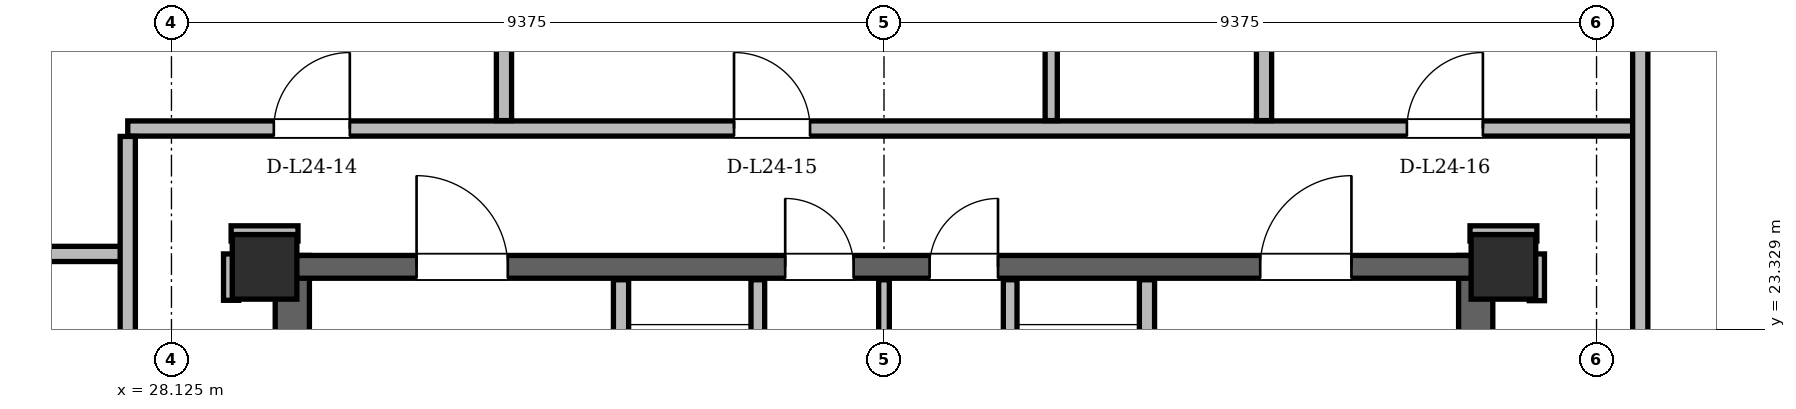
"""IFC4 building model, lengths in metres.
Left out: names, types, materials, properties, quantities, classifications, styles, units other than length and angle.
Written with IfcOpenShell. Run it as: python <this file> out.ifc"""

import sys

from ifc_helpers import new_model, si_unit, direction, frame, frame_2d, origin, origin_2d, place, context, subcontext, project, spatial, rectangle, hollow_rectangle, extrude, element, fill, save


model = new_model("IFC4")
c1 = context("Model", 3, precision=1e-05, world=origin(), true_north=direction((0.0, 1.0)))
c2 = subcontext(c1, "Body", "Model", "MODEL_VIEW")
j1 = project(units=[si_unit("LENGTHUNIT", "METRE"), si_unit("PLANEANGLEUNIT", "RADIAN")], contexts=[c1])
p1 = place(None, origin())
s1 = spatial("IfcSite", under=j1, at=p1, CompositionType="ELEMENT")
p2 = place(p1, origin())
s2 = spatial("IfcBuilding", under=s1, at=p2, CompositionType="ELEMENT")
p3 = place(p2, frame((0.0, 0.0, 93.3)))
s3 = spatial("IfcBuildingStorey", under=s2, at=p3, CompositionType="ELEMENT", Elevation=93.3)
for number, where, z_axis, x_axis in (
    (1, (45.65, 24.15, 0.0), (0.0, 0.0, 1.0), (1.0, 0.0, 0.0)),
    (2, (29.35, 24.15, 0.0), (0.0, 0.0, 1.0), (1.0, 0.0, 0.0)),
):
    element("IfcColumn", number, at=place(p3, frame(where, z_axis=z_axis, x_axis=x_axis)), inside=s3, PredefinedType="COLUMN", context=c2, shape_type="SweptSolid", body=[
        extrude(hollow_rectangle(XDim=0.85, YDim=0.85, WallThickness=0.07, at=origin_2d()), origin(), (0.0, 0.0, 1.0), 3.6),
    ])
for number, where, z_axis, x_axis in (
    (3, (29.715, 11.0, 0.0), (0.0, 0.0, 1.0), (0.0, 1.0, 0.0)),
    (4, (45.285, 11.0, 0.0), (0.0, 0.0, 1.0), (0.0, 1.0, 0.0)),
):
    element("IfcWall", number, at=place(p3, frame(where, z_axis=z_axis, x_axis=x_axis)), inside=s3, PredefinedType="SHEAR", context=c2, shape_type="SweptSolid", body=[
        extrude(rectangle(XDim=13.3, YDim=0.45, at=frame_2d((6.65, 0.0))), origin(), (0.0, 0.0, 1.0), 3.36),
    ])
p4 = place(p3, frame((29.65, 24.15, 0.0), z_axis=(0.0, 0.0, 1.0), x_axis=(1.0, 0.0, 0.0)))
e5 = element("IfcWall", 5, at=p4, inside=s3, PredefinedType="SHEAR", context=c2, shape_type="SweptSolid", body=[
    extrude(rectangle(XDim=15.7, YDim=0.3, at=frame_2d((7.85, 0.0))), origin(), (0.0, 0.0, 1.0), 3.36),
])
p5 = place(p4, frame((1.7, 0.0, 0.0)))
e6 = element("IfcOpeningElement", 6, at=p5, cuts=e5, PredefinedType="OPENING", context=c2, shape_type="SweptSolid", body=[
    extrude(rectangle(XDim=1.2, YDim=2.2, at=frame_2d((0.6, 1.1))), frame((0.0, 0.15, 0.0), z_axis=(0.0, -1.0, 0.0), x_axis=(1.0, 0.0, 0.0)), (0.0, 0.0, 1.0), 0.3),
])
p6 = place(p4, frame((12.8, 0.0, 0.0)))
e7 = element("IfcOpeningElement", 7, at=p6, cuts=e5, PredefinedType="OPENING", context=c2, shape_type="SweptSolid", body=[
    extrude(rectangle(XDim=1.2, YDim=2.2, at=frame_2d((0.6, 1.1))), frame((0.0, 0.15, 0.0), z_axis=(0.0, -1.0, 0.0), x_axis=(1.0, 0.0, 0.0)), (0.0, 0.0, 1.0), 0.3),
])
p7 = place(p4, frame((6.55, 0.0, 0.0)))
e8 = element("IfcOpeningElement", 8, at=p7, cuts=e5, PredefinedType="OPENING", context=c2, shape_type="SweptSolid", body=[
    extrude(rectangle(XDim=0.9, YDim=2.05, at=frame_2d((0.45, 1.025))), frame((0.0, 0.15, 0.0), z_axis=(0.0, -1.0, 0.0), x_axis=(1.0, 0.0, 0.0)), (0.0, 0.0, 1.0), 0.3),
])
p8 = place(p4, frame((8.45, 0.0, 0.0)))
e9 = element("IfcOpeningElement", 9, at=p8, cuts=e5, PredefinedType="OPENING", context=c2, shape_type="SweptSolid", body=[
    extrude(rectangle(XDim=0.9, YDim=2.05, at=frame_2d((0.45, 1.025))), frame((0.0, 0.15, 0.0), z_axis=(0.0, -1.0, 0.0), x_axis=(1.0, 0.0, 0.0)), (0.0, 0.0, 1.0), 0.3),
])
p9 = place(p3, frame((31.375, 43.472, 0.0), z_axis=(0.0, 0.0, 1.0), x_axis=(-0.499996390212, -0.866027487886, 0.0)))
e10 = element("IfcWall", 10, at=p9, inside=s3, PredefinedType="SOLIDWALL", context=c2, shape_type="SweptSolid", body=[
    extrude(rectangle(XDim=34.356, YDim=0.34, at=frame_2d((17.178, 0.0))), origin(), (0.0, 0.0, 1.0), 2.578),
])
p10 = place(p9, frame((7.824, 0.0, 0.0)))
e11 = element("IfcOpeningElement", 11, at=p10, cuts=e10, PredefinedType="OPENING", context=c2, shape_type="SweptSolid", body=[
    extrude(rectangle(XDim=1.5, YDim=2.2, at=frame_2d((0.75, 1.1))), frame((0.0, 0.17, 0.0), z_axis=(0.0, -1.0, 0.0), x_axis=(1.0, 0.0, 0.0)), (0.0, 0.0, 1.0), 0.34),
])
p11 = place(p9, frame((25.647, 0.0, 0.0)))
e12 = element("IfcOpeningElement", 12, at=p11, cuts=e10, PredefinedType="OPENING", context=c2, shape_type="SweptSolid", body=[
    extrude(rectangle(XDim=1.5, YDim=2.2, at=frame_2d((0.75, 1.1))), frame((0.0, 0.17, 0.0), z_axis=(0.0, -1.0, 0.0), x_axis=(1.0, 0.0, 0.0)), (0.0, 0.0, 1.0), 0.34),
])
p12 = place(p9, frame((30.715, 0.0, 0.85)))
e13 = element("IfcOpeningElement", 13, at=p12, cuts=e10, PredefinedType="OPENING", context=c2, shape_type="SweptSolid", body=[
    extrude(rectangle(XDim=1.4, YDim=1.6, at=frame_2d((0.7, 0.8))), frame((0.0, 0.17, 0.0), z_axis=(0.0, -1.0, 0.0), x_axis=(1.0, 0.0, 0.0)), (0.0, 0.0, 1.0), 0.34),
])
p13 = place(p9, frame((1.038, 0.0, 0.85)))
e14 = element("IfcOpeningElement", 14, at=p13, cuts=e10, PredefinedType="OPENING", context=c2, shape_type="SweptSolid", body=[
    extrude(rectangle(XDim=2.8, YDim=1.618, at=frame_2d((1.4, 0.809))), frame((0.0, 0.17, 0.0), z_axis=(0.0, -1.0, 0.0), x_axis=(1.0, 0.0, 0.0)), (0.0, 0.0, 1.0), 0.34),
])
p14 = place(p9, frame((12.775, 0.0, 0.85)))
e15 = element("IfcOpeningElement", 15, at=p14, cuts=e10, PredefinedType="OPENING", context=c2, shape_type="SweptSolid", body=[
    extrude(rectangle(XDim=2.2, YDim=1.618, at=frame_2d((1.1, 0.809))), frame((0.0, 0.17, 0.0), z_axis=(0.0, -1.0, 0.0), x_axis=(1.0, 0.0, 0.0)), (0.0, 0.0, 1.0), 0.34),
])
p15 = place(p9, frame((18.07, 0.0, 0.85)))
e16 = element("IfcOpeningElement", 16, at=p15, cuts=e10, PredefinedType="OPENING", context=c2, shape_type="SweptSolid", body=[
    extrude(rectangle(XDim=1.2, YDim=1.48, at=frame_2d((0.6, 0.74))), frame((0.0, 0.17, 0.0), z_axis=(0.0, -1.0, 0.0), x_axis=(1.0, 0.0, 0.0)), (0.0, 0.0, 1.0), 0.34),
])
p16 = place(p3, frame((34.04, 19.48, 0.0), z_axis=(0.0, 0.0, 1.0), x_axis=(0.0, 1.0, 0.0)))
e17 = element("IfcWall", 17, at=p16, inside=s3, PredefinedType="PARTITIONING", context=c2, shape_type="SweptSolid", body=[
    extrude(rectangle(XDim=4.5, YDim=0.2, at=frame_2d((2.25, 0.0))), origin(), (0.0, 0.0, 1.0), 2.4),
])
p17 = place(p16, frame((2.12, 0.0, 0.0)))
e18 = element("IfcOpeningElement", 18, at=p17, cuts=e17, PredefinedType="OPENING", context=c2, shape_type="SweptSolid", body=[
    extrude(rectangle(XDim=1.1, YDim=2.2, at=frame_2d((0.55, 1.1))), frame((0.0, 0.1, 0.0), z_axis=(0.0, -1.0, 0.0), x_axis=(1.0, 0.0, 0.0)), (0.0, 0.0, 1.0), 0.2),
])
p18 = place(p3, frame((35.84, 20.96, 0.0), z_axis=(0.0, 0.0, 1.0), x_axis=(0.0, 1.0, 0.0)))
e19 = element("IfcWall", 19, at=p18, inside=s3, PredefinedType="PARTITIONING", context=c2, shape_type="SweptSolid", body=[
    extrude(rectangle(XDim=3.02, YDim=0.18, at=frame_2d((1.51, 0.0))), origin(), (0.0, 0.0, 1.0), 2.4),
])
p19 = place(p3, frame((40.96, 19.48, 0.0), z_axis=(0.0, 0.0, 1.0), x_axis=(0.0, 1.0, 0.0)))
e20 = element("IfcWall", 20, at=p19, inside=s3, PredefinedType="PARTITIONING", context=c2, shape_type="SweptSolid", body=[
    extrude(rectangle(XDim=4.5, YDim=0.2, at=frame_2d((2.25, 0.0))), origin(), (0.0, 0.0, 1.0), 2.4),
])
p20 = place(p19, frame((2.12, 0.0, 0.0)))
e21 = element("IfcOpeningElement", 21, at=p20, cuts=e20, PredefinedType="OPENING", context=c2, shape_type="SweptSolid", body=[
    extrude(rectangle(XDim=1.1, YDim=2.2, at=frame_2d((0.55, 1.1))), frame((0.0, 0.1, 0.0), z_axis=(0.0, -1.0, 0.0), x_axis=(1.0, 0.0, 0.0)), (0.0, 0.0, 1.0), 0.2),
])
p21 = place(p3, frame((39.16, 20.96, 0.0), z_axis=(0.0, 0.0, 1.0), x_axis=(0.0, 1.0, 0.0)))
e22 = element("IfcWall", 22, at=p21, inside=s3, PredefinedType="PARTITIONING", context=c2, shape_type="SweptSolid", body=[
    extrude(rectangle(XDim=3.02, YDim=0.18, at=frame_2d((1.51, 0.0))), origin(), (0.0, 0.0, 1.0), 2.4),
])
p22 = place(p3, frame((37.5, 21.06, 0.0), z_axis=(0.0, 0.0, 1.0), x_axis=(0.0, 1.0, 0.0)))
e23 = element("IfcWall", 23, at=p22, inside=s3, PredefinedType="PARTITIONING", context=c2, shape_type="SweptSolid", body=[
    extrude(rectangle(XDim=2.92, YDim=0.14, at=frame_2d((1.46, 0.0))), origin(), (0.0, 0.0, 1.0), 2.4),
])
p23 = place(p3, frame((20.519, 24.32, 0.0), z_axis=(0.0, 0.0, 1.0), x_axis=(1.0, 0.0, 0.0)))
e24 = element("IfcWall", 24, at=p23, inside=s3, PredefinedType="PARTITIONING", context=c2, shape_type="SweptSolid", body=[
    extrude(rectangle(XDim=7.031, YDim=0.2, at=frame_2d((3.516, 0.0))), origin(), (0.0, 0.0, 1.0), 3.36),
])
for number, where, z_axis, x_axis in (
    (25, (28.91, 24.59, 0.0), (0.0, 0.0, 1.0), (1.0, 0.0, 0.0)),
    (26, (45.21, 24.59, 0.0), (0.0, 0.0, 1.0), (1.0, 0.0, 0.0)),
):
    element("IfcWall", number, at=place(p3, frame(where, z_axis=z_axis, x_axis=x_axis)), inside=s3, PredefinedType="PARTITIONING", context=c2, shape_type="SweptSolid", body=[
        extrude(rectangle(XDim=0.88, YDim=0.2, at=frame_2d((0.44, 0.0))), origin(), (0.0, 0.0, 1.0), 2.814),
    ])
p24 = place(p3, frame((27.55, 25.97, 0.0), z_axis=(0.0, 0.0, 1.0), x_axis=(1.0, 0.0, 0.0)))
e27 = element("IfcWall", 27, at=p24, inside=s3, PredefinedType="PARTITIONING", context=c2, shape_type="SweptSolid", body=[
    extrude(rectangle(XDim=19.9, YDim=0.2, at=frame_2d((9.95, 0.0))), origin(), (0.0, 0.0, 1.0), 2.814),
])
p25 = place(p24, frame((1.922, 0.0, 0.0)))
e28 = element("IfcOpeningElement", 28, at=p25, cuts=e27, PredefinedType="OPENING", context=c2, shape_type="SweptSolid", body=[
    extrude(rectangle(XDim=1.0, YDim=2.18, at=frame_2d((0.5, 1.09))), frame((0.0, 0.1, 0.0), z_axis=(0.0, -1.0, 0.0), x_axis=(1.0, 0.0, 0.0)), (0.0, 0.0, 1.0), 0.2),
])
p26 = place(p24, frame((7.977, 0.0, 0.0)))
e29 = element("IfcOpeningElement", 29, at=p26, cuts=e27, PredefinedType="OPENING", context=c2, shape_type="SweptSolid", body=[
    extrude(rectangle(XDim=1.0, YDim=2.18, at=frame_2d((0.5, 1.09))), frame((0.0, 0.1, 0.0), z_axis=(0.0, -1.0, 0.0), x_axis=(1.0, 0.0, 0.0)), (0.0, 0.0, 1.0), 0.2),
])
p27 = place(p24, frame((16.83, 0.0, 0.0)))
e30 = element("IfcOpeningElement", 30, at=p27, cuts=e27, PredefinedType="OPENING", context=c2, shape_type="SweptSolid", body=[
    extrude(rectangle(XDim=1.0, YDim=2.18, at=frame_2d((0.5, 1.09))), frame((0.0, 0.1, 0.0), z_axis=(0.0, -1.0, 0.0), x_axis=(1.0, 0.0, 0.0)), (0.0, 0.0, 1.0), 0.2),
])
p28 = place(p3, frame((27.55, 11.054, 0.0), z_axis=(0.0, 0.0, 1.0), x_axis=(0.0, 1.0, 0.0)))
e31 = element("IfcWall", 31, at=p28, inside=s3, PredefinedType="PARTITIONING", context=c2, shape_type="SweptSolid", body=[
    extrude(rectangle(XDim=14.812, YDim=0.2, at=frame_2d((7.406, 0.0))), origin(), (0.0, 0.0, 1.0), 2.814),
])
p29 = place(p28, frame((3.825, 0.0, 0.0)))
e32 = element("IfcOpeningElement", 32, at=p29, cuts=e31, PredefinedType="OPENING", context=c2, shape_type="SweptSolid", body=[
    extrude(rectangle(XDim=1.0, YDim=2.18, at=frame_2d((0.5, 1.09))), frame((0.0, 0.1, 0.0), z_axis=(0.0, -1.0, 0.0), x_axis=(1.0, 0.0, 0.0)), (0.0, 0.0, 1.0), 0.2),
])
p30 = place(p28, frame((10.328, 0.0, 0.0)))
e33 = element("IfcOpeningElement", 33, at=p30, cuts=e31, PredefinedType="OPENING", context=c2, shape_type="SweptSolid", body=[
    extrude(rectangle(XDim=1.0, YDim=2.18, at=frame_2d((0.5, 1.09))), frame((0.0, 0.1, 0.0), z_axis=(0.0, -1.0, 0.0), x_axis=(1.0, 0.0, 0.0)), (0.0, 0.0, 1.0), 0.2),
])
p31 = place(p3, frame((28.91, 23.71, 0.0), z_axis=(0.0, 0.0, 1.0), x_axis=(0.0, 1.0, 0.0)))
e34 = element("IfcWall", 34, at=p31, inside=s3, PredefinedType="PARTITIONING", context=c2, shape_type="SweptSolid", body=[
    extrude(rectangle(XDim=0.61, YDim=0.2, at=frame_2d((0.305, 0.0))), origin(), (0.0, 0.0, 1.0), 3.36),
])
p32 = place(p3, frame((32.5, 26.074, 0.0), z_axis=(0.0, 0.0, 1.0), x_axis=(0.0, 1.0, 0.0)))
e35 = element("IfcWall", 35, at=p32, inside=s3, PredefinedType="PARTITIONING", context=c2, shape_type="SweptSolid", body=[
    extrude(rectangle(XDim=17.224, YDim=0.2, at=frame_2d((8.612, 0.0))), origin(), (0.0, 0.0, 1.0), 3.36),
])
p33 = place(p3, frame((39.7, 26.074, 0.0), z_axis=(0.0, 0.0, 1.0), x_axis=(0.0, 1.0, 0.0)))
e36 = element("IfcWall", 36, at=p33, inside=s3, PredefinedType="PARTITIONING", context=c2, shape_type="SweptSolid", body=[
    extrude(rectangle(XDim=17.224, YDim=0.16, at=frame_2d((8.612, 0.0))), origin(), (0.0, 0.0, 1.0), 3.36),
])
p34 = place(p33, frame((1.255, 0.0, 0.0)))
e37 = element("IfcOpeningElement", 37, at=p34, cuts=e36, PredefinedType="OPENING", context=c2, shape_type="SweptSolid", body=[
    extrude(rectangle(XDim=0.92, YDim=2.12, at=frame_2d((0.46, 1.06))), frame((0.0, 0.08, 0.0), z_axis=(0.0, -1.0, 0.0), x_axis=(1.0, 0.0, 0.0)), (0.0, 0.0, 1.0), 0.16),
])
p35 = place(p33, frame((4.83, 0.0, 0.0)))
e38 = element("IfcOpeningElement", 38, at=p35, cuts=e36, PredefinedType="OPENING", context=c2, shape_type="SweptSolid", body=[
    extrude(rectangle(XDim=0.92, YDim=2.12, at=frame_2d((0.46, 1.06))), frame((0.0, 0.08, 0.0), z_axis=(0.0, -1.0, 0.0), x_axis=(1.0, 0.0, 0.0)), (0.0, 0.0, 1.0), 0.16),
])
p36 = place(p33, frame((7.896, 0.0, 0.0)))
e39 = element("IfcOpeningElement", 39, at=p36, cuts=e36, PredefinedType="OPENING", context=c2, shape_type="SweptSolid", body=[
    extrude(rectangle(XDim=0.95, YDim=2.1, at=frame_2d((0.475, 1.05))), frame((0.0, 0.08, 0.0), z_axis=(0.0, -1.0, 0.0), x_axis=(1.0, 0.0, 0.0)), (0.0, 0.0, 1.0), 0.16),
])
p37 = place(p33, frame((10.484, 0.0, 0.0)))
e40 = element("IfcOpeningElement", 40, at=p37, cuts=e36, PredefinedType="OPENING", context=c2, shape_type="SweptSolid", body=[
    extrude(rectangle(XDim=0.95, YDim=2.1, at=frame_2d((0.475, 1.05))), frame((0.0, 0.08, 0.0), z_axis=(0.0, -1.0, 0.0), x_axis=(1.0, 0.0, 0.0)), (0.0, 0.0, 1.0), 0.16),
])
p38 = place(p33, frame((13.242, 0.0, 0.0)))
e41 = element("IfcOpeningElement", 41, at=p38, cuts=e36, PredefinedType="OPENING", context=c2, shape_type="SweptSolid", body=[
    extrude(rectangle(XDim=0.95, YDim=2.1, at=frame_2d((0.475, 1.05))), frame((0.0, 0.08, 0.0), z_axis=(0.0, -1.0, 0.0), x_axis=(1.0, 0.0, 0.0)), (0.0, 0.0, 1.0), 0.16),
])
p39 = place(p33, frame((15.82, 0.0, 0.0)))
e42 = element("IfcOpeningElement", 42, at=p39, cuts=e36, PredefinedType="OPENING", context=c2, shape_type="SweptSolid", body=[
    extrude(rectangle(XDim=0.88, YDim=2.08, at=frame_2d((0.44, 1.04))), frame((0.0, 0.08, 0.0), z_axis=(0.0, -1.0, 0.0), x_axis=(1.0, 0.0, 0.0)), (0.0, 0.0, 1.0), 0.16),
])
p40 = place(p3, frame((42.5, 26.074, 0.0), z_axis=(0.0, 0.0, 1.0), x_axis=(0.0, 1.0, 0.0)))
e43 = element("IfcWall", 43, at=p40, inside=s3, PredefinedType="PARTITIONING", context=c2, shape_type="SweptSolid", body=[
    extrude(rectangle(XDim=17.224, YDim=0.2, at=frame_2d((8.612, 0.0))), origin(), (0.0, 0.0, 1.0), 3.36),
])
p41 = place(p3, frame((46.09, 23.705, 0.0), z_axis=(0.0, 0.0, 1.0), x_axis=(0.0, 1.0, 0.0)))
e44 = element("IfcWall", 44, at=p41, inside=s3, PredefinedType="PARTITIONING", context=c2, shape_type="SweptSolid", body=[
    extrude(rectangle(XDim=0.615, YDim=0.2, at=frame_2d((0.308, 0.0))), origin(), (0.0, 0.0, 1.0), 2.946),
])
p42 = place(p3, frame((47.45, 11.054, 0.0), z_axis=(0.0, 0.0, 1.0), x_axis=(0.0, 1.0, 0.0)))
e45 = element("IfcWall", 45, at=p42, inside=s3, PredefinedType="PARTITIONING", context=c2, shape_type="SweptSolid", body=[
    extrude(rectangle(XDim=25.444, YDim=0.2, at=frame_2d((12.722, 0.0))), origin(), (0.0, 0.0, 1.0), 2.578),
])
p43 = place(p42, frame((10.335, 0.0, 0.0)))
e46 = element("IfcOpeningElement", 46, at=p43, cuts=e45, PredefinedType="OPENING", context=c2, shape_type="SweptSolid", body=[
    extrude(rectangle(XDim=1.0, YDim=2.18, at=frame_2d((0.5, 1.09))), frame((0.0, 0.1, 0.0), z_axis=(0.0, -1.0, 0.0), x_axis=(1.0, 0.0, 0.0)), (0.0, 0.0, 1.0), 0.2),
])
p44 = place(p5, origin())
e47 = element("IfcDoor", 47, at=p44, inside=s3, OperationType="SINGLE_SWING_LEFT", PredefinedType="DOOR", context=c2, shape_type="SweptSolid", body=[
    extrude(rectangle(XDim=1.2, YDim=2.2, at=frame_2d((0.6, 1.1))), frame((0.0, 0.025, 0.0), z_axis=(0.0, -1.0, 0.0), x_axis=(1.0, 0.0, 0.0)), (0.0, 0.0, 1.0), 0.05),
])
fill(e6, e47)
p45 = place(p6, origin())
e48 = element("IfcDoor", 48, at=p45, inside=s3, OperationType="SINGLE_SWING_RIGHT", PredefinedType="DOOR", context=c2, shape_type="SweptSolid", body=[
    extrude(rectangle(XDim=1.2, YDim=2.2, at=frame_2d((0.6, 1.1))), frame((0.0, 0.025, 0.0), z_axis=(0.0, -1.0, 0.0), x_axis=(1.0, 0.0, 0.0)), (0.0, 0.0, 1.0), 0.05),
])
fill(e7, e48)
p46 = place(p7, origin())
e49 = element("IfcDoor", 49, at=p46, inside=s3, OperationType="SINGLE_SWING_LEFT", PredefinedType="DOOR", context=c2, shape_type="SweptSolid", body=[
    extrude(rectangle(XDim=0.9, YDim=2.05, at=frame_2d((0.45, 1.025))), frame((0.0, 0.025, 0.0), z_axis=(0.0, -1.0, 0.0), x_axis=(1.0, 0.0, 0.0)), (0.0, 0.0, 1.0), 0.05),
])
fill(e8, e49)
p47 = place(p8, origin())
e50 = element("IfcDoor", 50, at=p47, inside=s3, OperationType="SINGLE_SWING_RIGHT", PredefinedType="DOOR", context=c2, shape_type="SweptSolid", body=[
    extrude(rectangle(XDim=0.9, YDim=2.05, at=frame_2d((0.45, 1.025))), frame((0.0, 0.025, 0.0), z_axis=(0.0, -1.0, 0.0), x_axis=(1.0, 0.0, 0.0)), (0.0, 0.0, 1.0), 0.05),
])
fill(e9, e50)
p48 = place(p25, origin())
e51 = element("IfcDoor", 51, at=p48, inside=s3, OperationType="SINGLE_SWING_RIGHT", PredefinedType="DOOR", context=c2, shape_type="SweptSolid", body=[
    extrude(rectangle(XDim=1.0, YDim=2.18, at=frame_2d((0.5, 1.09))), frame((0.0, 0.025, 0.0), z_axis=(0.0, -1.0, 0.0), x_axis=(1.0, 0.0, 0.0)), (0.0, 0.0, 1.0), 0.05),
])
fill(e28, e51)
p49 = place(p26, origin())
e52 = element("IfcDoor", 52, at=p49, inside=s3, OperationType="SINGLE_SWING_LEFT", PredefinedType="DOOR", context=c2, shape_type="SweptSolid", body=[
    extrude(rectangle(XDim=1.0, YDim=2.18, at=frame_2d((0.5, 1.09))), frame((0.0, 0.025, 0.0), z_axis=(0.0, -1.0, 0.0), x_axis=(1.0, 0.0, 0.0)), (0.0, 0.0, 1.0), 0.05),
])
fill(e29, e52)
p50 = place(p27, origin())
e53 = element("IfcDoor", 53, at=p50, inside=s3, OperationType="SINGLE_SWING_RIGHT", PredefinedType="DOOR", context=c2, shape_type="SweptSolid", body=[
    extrude(rectangle(XDim=1.0, YDim=2.18, at=frame_2d((0.5, 1.09))), frame((0.0, 0.025, 0.0), z_axis=(0.0, -1.0, 0.0), x_axis=(1.0, 0.0, 0.0)), (0.0, 0.0, 1.0), 0.05),
])
fill(e30, e53)
save(model, sys.argv[1])
